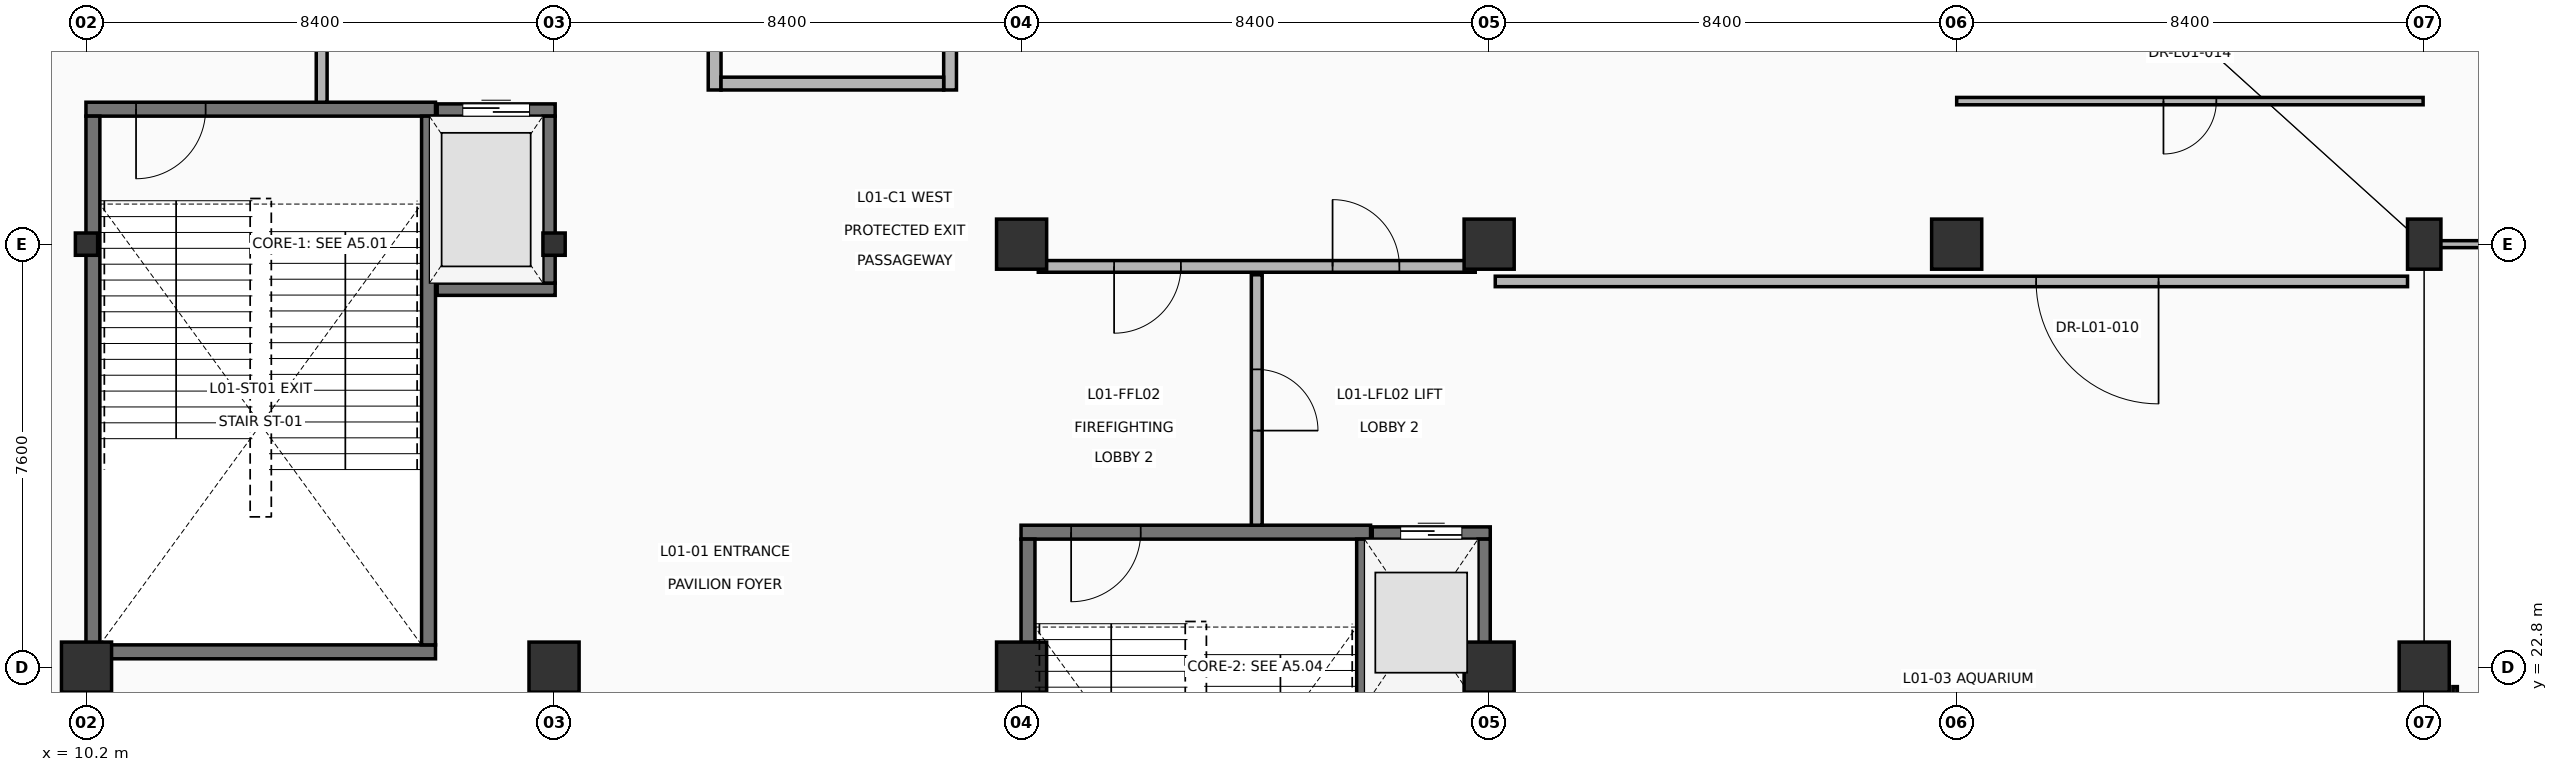
"""IFC4 building model, lengths in metres.
Left out: names, types, materials, properties, quantities, classifications, styles, units other than length and angle.
Written with IfcOpenShell. Run it as: python <this file> out.ifc"""

import sys

from ifc_helpers import new_model, si_unit, direction, frame, frame_2d, origin, origin_2d, place, context, subcontext, project, spatial, rectangle, hollow_rectangle, extrude, element, fill, save


model = new_model("IFC4")
c1 = context("Model", 3, precision=1e-05, world=origin(), true_north=direction((0.0, 1.0)))
c2 = subcontext(c1, "Body", "Model", "MODEL_VIEW")
j1 = project(units=[si_unit("LENGTHUNIT", "METRE"), si_unit("PLANEANGLEUNIT", "RADIAN")], contexts=[c1])
p1 = place(None, origin())
s1 = spatial("IfcSite", under=j1, at=p1, CompositionType="ELEMENT")
p2 = place(p1, origin())
s2 = spatial("IfcBuilding", under=s1, at=p2, CompositionType="ELEMENT")
p3 = place(p2, origin())
s3 = spatial("IfcBuildingStorey", under=s2, at=p3, CompositionType="ELEMENT", Elevation=0.0)
p4 = place(p3, frame((10.2, 22.8, 0.0), z_axis=(0.0, 0.0, 1.0), x_axis=(1.0, 0.0, 0.0)))
e1 = element("IfcColumn", 1, at=p4, inside=s3, PredefinedType="COLUMN", context=c2, shape_type="SweptSolid", body=[
    extrude(rectangle(XDim=0.9, YDim=0.9, at=origin_2d()), origin(), (0.0, 0.0, 1.0), 5.4),
])
p5 = place(p3, frame((10.2, 30.4, 0.0), z_axis=(0.0, 0.0, 1.0), x_axis=(1.0, 0.0, 0.0)))
e2 = element("IfcColumn", 2, at=p5, inside=s3, PredefinedType="COLUMN", context=c2, shape_type="SweptSolid", body=[
    extrude(hollow_rectangle(XDim=0.4, YDim=0.4, WallThickness=0.016, at=origin_2d()), origin(), (0.0, 0.0, 1.0), 5.4),
])
p6 = place(p3, frame((18.6, 22.8, 0.0), z_axis=(0.0, 0.0, 1.0), x_axis=(1.0, 0.0, 0.0)))
e3 = element("IfcColumn", 3, at=p6, inside=s3, PredefinedType="COLUMN", context=c2, shape_type="SweptSolid", body=[
    extrude(rectangle(XDim=0.9, YDim=0.9, at=origin_2d()), origin(), (0.0, 0.0, 1.0), 5.4),
])
p7 = place(p3, frame((18.6, 30.4, 0.0), z_axis=(0.0, 0.0, 1.0), x_axis=(1.0, 0.0, 0.0)))
e4 = element("IfcColumn", 4, at=p7, inside=s3, PredefinedType="COLUMN", context=c2, shape_type="SweptSolid", body=[
    extrude(hollow_rectangle(XDim=0.4, YDim=0.4, WallThickness=0.016, at=origin_2d()), origin(), (0.0, 0.0, 1.0), 5.4),
])
for number, where, z_axis, x_axis in (
    (5, (27.0, 22.8, 0.0), (0.0, 0.0, 1.0), (1.0, 0.0, 0.0)),
    (6, (27.0, 30.4, 0.0), (0.0, 0.0, 1.0), (1.0, 0.0, 0.0)),
    (7, (35.4, 22.8, 0.0), (0.0, 0.0, 1.0), (1.0, 0.0, 0.0)),
    (8, (35.4, 30.4, 0.0), (0.0, 0.0, 1.0), (1.0, 0.0, 0.0)),
    (9, (43.8, 30.4, 0.0), (0.0, 0.0, 1.0), (1.0, 0.0, 0.0)),
    (10, (52.2, 22.8, 0.0), (0.0, 0.0, 1.0), (1.0, 0.0, 0.0)),
):
    element("IfcColumn", number, at=place(p3, frame(where, z_axis=z_axis, x_axis=x_axis)), inside=s3, PredefinedType="COLUMN", context=c2, shape_type="SweptSolid", body=[
        extrude(rectangle(XDim=0.9, YDim=0.9, at=origin_2d()), origin(), (0.0, 0.0, 1.0), 5.4),
    ])
p8 = place(p3, frame((52.2, 30.4, 0.0), z_axis=(0.0, 0.0, 1.0), x_axis=(1.0, 0.0, 0.0)))
e11 = element("IfcColumn", 11, at=p8, inside=s3, PredefinedType="COLUMN", context=c2, shape_type="SweptSolid", body=[
    extrude(rectangle(XDim=0.6, YDim=0.9, at=origin_2d()), origin(), (0.0, 0.0, 1.0), 5.4),
])
p9 = place(p3, frame((52.05, 22.365, 0.0), z_axis=(0.0, 0.0, 1.0), x_axis=(0.0, -1.0, 0.0)))
e12 = element("IfcWall", 12, at=p9, inside=s3, PredefinedType="SOLIDWALL", context=c2, shape_type="SweptSolid", body=[
    extrude(rectangle(XDim=7.185, YDim=0.3, at=frame_2d((3.593, 0.0))), origin(), (0.0, 0.0, 1.0), 5.16),
])
p10 = place(p9, frame((2.392, 0.0, 0.0)))
e13 = element("IfcOpeningElement", 13, at=p10, cuts=e12, PredefinedType="OPENING", context=c2, shape_type="SweptSolid", body=[
    extrude(rectangle(XDim=2.4, YDim=2.6, at=frame_2d((1.2, 1.3))), frame((0.0, 0.16, 0.0), z_axis=(0.0, -1.0, 0.0), x_axis=(1.0, 0.0, 0.0)), (0.0, 0.0, 1.0), 0.32),
])
p11 = place(p3, frame((10.19, 23.075, 0.0), z_axis=(0.0, 0.0, 1.0), x_axis=(1.0, 0.0, 0.0)))
e14 = element("IfcWall", 14, at=p11, inside=s3, PredefinedType="SHEAR", context=c2, shape_type="SweptSolid", body=[
    extrude(rectangle(XDim=6.28, YDim=0.25, at=frame_2d((3.14, 0.0))), origin(), (0.0, 0.0, 1.0), 5.14),
])
p12 = place(p3, frame((10.19, 32.825, 0.0), z_axis=(0.0, 0.0, 1.0), x_axis=(1.0, 0.0, 0.0)))
e15 = element("IfcWall", 15, at=p12, inside=s3, PredefinedType="SHEAR", context=c2, shape_type="SweptSolid", body=[
    extrude(rectangle(XDim=6.28, YDim=0.25, at=frame_2d((3.14, 0.0))), origin(), (0.0, 0.0, 1.0), 5.14),
])
p13 = place(p12, frame((0.9, 0.0, 0.0)))
e16 = element("IfcOpeningElement", 16, at=p13, cuts=e15, PredefinedType="OPENING", context=c2, shape_type="SweptSolid", body=[
    extrude(rectangle(XDim=1.25, YDim=2.2, at=frame_2d((0.625, 1.1))), frame((0.0, 0.135, 0.0), z_axis=(0.0, -1.0, 0.0), x_axis=(1.0, 0.0, 0.0)), (0.0, 0.0, 1.0), 0.27),
])
for number, where, z_axis, x_axis in (
    (17, (10.315, 23.2, 0.0), (0.0, 0.0, 1.0), (0.0, 1.0, 0.0)),
    (18, (16.345, 23.2, 0.0), (0.0, 0.0, 1.0), (0.0, 1.0, 0.0)),
):
    element("IfcWall", number, at=place(p3, frame(where, z_axis=z_axis, x_axis=x_axis)), inside=s3, PredefinedType="SHEAR", context=c2, shape_type="SweptSolid", body=[
        extrude(rectangle(XDim=9.5, YDim=0.25, at=frame_2d((4.75, 0.0))), origin(), (0.0, 0.0, 1.0), 5.14),
    ])
p14 = place(p3, frame((16.5, 29.59, 0.0), z_axis=(0.0, 0.0, 1.0), x_axis=(1.0, 0.0, 0.0)))
e19 = element("IfcWall", 19, at=p14, inside=s3, PredefinedType="SHEAR", context=c2, shape_type="SweptSolid", body=[
    extrude(rectangle(XDim=2.12, YDim=0.22, at=frame_2d((1.06, 0.0))), origin(), (0.0, 0.0, 1.0), 5.14),
])
p15 = place(p3, frame((16.5, 32.81, 0.0), z_axis=(0.0, 0.0, 1.0), x_axis=(1.0, 0.0, 0.0)))
e20 = element("IfcWall", 20, at=p15, inside=s3, PredefinedType="SHEAR", context=c2, shape_type="SweptSolid", body=[
    extrude(rectangle(XDim=2.12, YDim=0.22, at=frame_2d((1.06, 0.0))), origin(), (0.0, 0.0, 1.0), 5.14),
])
p16 = place(p15, frame((0.46, 0.0, 0.0)))
e21 = element("IfcOpeningElement", 21, at=p16, cuts=e20, PredefinedType="OPENING", context=c2, shape_type="SweptSolid", body=[
    extrude(rectangle(XDim=1.2, YDim=2.2, at=frame_2d((0.6, 1.1))), frame((0.0, 0.12, 0.0), z_axis=(0.0, -1.0, 0.0), x_axis=(1.0, 0.0, 0.0)), (0.0, 0.0, 1.0), 0.24),
])
p17 = place(p3, frame((18.51, 29.7, 0.0), z_axis=(0.0, 0.0, 1.0), x_axis=(0.0, 1.0, 0.0)))
e22 = element("IfcWall", 22, at=p17, inside=s3, PredefinedType="SHEAR", context=c2, shape_type="SweptSolid", body=[
    extrude(rectangle(XDim=3.0, YDim=0.22, at=frame_2d((1.5, 0.0))), origin(), (0.0, 0.0, 1.0), 5.14),
])
p18 = place(p3, frame((14.425, 32.95, 0.0), z_axis=(0.0, 0.0, 1.0), x_axis=(0.0, 1.0, 0.0)))
e23 = element("IfcWall", 23, at=p18, inside=s3, PredefinedType="PARTITIONING", context=c2, shape_type="SweptSolid", body=[
    extrude(rectangle(XDim=4.5, YDim=0.195, at=frame_2d((2.25, 0.0))), origin(), (0.0, 0.0, 1.0), 5.14),
])
p19 = place(p18, frame((1.7, 0.0, 0.0)))
e24 = element("IfcOpeningElement", 24, at=p19, cuts=e23, PredefinedType="OPENING", context=c2, shape_type="SweptSolid", body=[
    extrude(rectangle(XDim=1.1, YDim=2.15, at=frame_2d((0.55, 1.075))), frame((0.0, 0.107, 0.0), z_axis=(0.0, -1.0, 0.0), x_axis=(1.0, 0.0, 0.0)), (0.0, 0.0, 1.0), 0.215),
])
p20 = place(p3, frame((26.99, 25.225, 0.0), z_axis=(0.0, 0.0, 1.0), x_axis=(1.0, 0.0, 0.0)))
e25 = element("IfcWall", 25, at=p20, inside=s3, PredefinedType="SHEAR", context=c2, shape_type="SweptSolid", body=[
    extrude(rectangle(XDim=6.28, YDim=0.25, at=frame_2d((3.14, 0.0))), origin(), (0.0, 0.0, 1.0), 5.14),
])
p21 = place(p20, frame((0.9, 0.0, 0.0)))
e26 = element("IfcOpeningElement", 26, at=p21, cuts=e25, PredefinedType="OPENING", context=c2, shape_type="SweptSolid", body=[
    extrude(rectangle(XDim=1.25, YDim=2.2, at=frame_2d((0.625, 1.1))), frame((0.0, 0.135, 0.0), z_axis=(0.0, -1.0, 0.0), x_axis=(1.0, 0.0, 0.0)), (0.0, 0.0, 1.0), 0.27),
])
for number, where, z_axis, x_axis in (
    (27, (27.115, 15.6, 0.0), (0.0, 0.0, 1.0), (0.0, 1.0, 0.0)),
    (28, (33.145, 15.6, 0.0), (0.0, 0.0, 1.0), (0.0, 1.0, 0.0)),
):
    element("IfcWall", number, at=place(p3, frame(where, z_axis=z_axis, x_axis=x_axis)), inside=s3, PredefinedType="SHEAR", context=c2, shape_type="SweptSolid", body=[
        extrude(rectangle(XDim=9.5, YDim=0.25, at=frame_2d((4.75, 0.0))), origin(), (0.0, 0.0, 1.0), 5.14),
    ])
p22 = place(p3, frame((33.3, 25.21, 0.0), z_axis=(0.0, 0.0, 1.0), x_axis=(1.0, 0.0, 0.0)))
e29 = element("IfcWall", 29, at=p22, inside=s3, PredefinedType="SHEAR", context=c2, shape_type="SweptSolid", body=[
    extrude(rectangle(XDim=2.12, YDim=0.22, at=frame_2d((1.06, 0.0))), origin(), (0.0, 0.0, 1.0), 5.14),
])
p23 = place(p22, frame((0.51, 0.0, 0.0)))
e30 = element("IfcOpeningElement", 30, at=p23, cuts=e29, PredefinedType="OPENING", context=c2, shape_type="SweptSolid", body=[
    extrude(rectangle(XDim=1.1, YDim=2.15, at=frame_2d((0.55, 1.075))), frame((0.0, 0.12, 0.0), z_axis=(0.0, -1.0, 0.0), x_axis=(1.0, 0.0, 0.0)), (0.0, 0.0, 1.0), 0.24),
])
p24 = place(p3, frame((35.31, 22.1, 0.0), z_axis=(0.0, 0.0, 1.0), x_axis=(0.0, 1.0, 0.0)))
e31 = element("IfcWall", 31, at=p24, inside=s3, PredefinedType="SHEAR", context=c2, shape_type="SweptSolid", body=[
    extrude(rectangle(XDim=3.0, YDim=0.22, at=frame_2d((1.5, 0.0))), origin(), (0.0, 0.0, 1.0), 5.14),
])
p25 = place(p3, frame((27.3, 30.0, 0.0), z_axis=(0.0, 0.0, 1.0), x_axis=(1.0, 0.0, 0.0)))
e32 = element("IfcWall", 32, at=p25, inside=s3, PredefinedType="PARTITIONING", context=c2, shape_type="SweptSolid", body=[
    extrude(rectangle(XDim=7.85, YDim=0.21, at=frame_2d((3.925, 0.0))), origin(), (0.0, 0.0, 1.0), 5.14),
])
p26 = place(p25, frame((1.362, 0.0, 0.0)))
e33 = element("IfcOpeningElement", 33, at=p26, cuts=e32, PredefinedType="OPENING", context=c2, shape_type="SweptSolid", body=[
    extrude(rectangle(XDim=1.2, YDim=2.2, at=frame_2d((0.6, 1.1))), frame((0.0, 0.115, 0.0), z_axis=(0.0, -1.0, 0.0), x_axis=(1.0, 0.0, 0.0)), (0.0, 0.0, 1.0), 0.23),
])
p27 = place(p25, frame((5.287, 0.0, 0.0)))
e34 = element("IfcOpeningElement", 34, at=p27, cuts=e32, PredefinedType="OPENING", context=c2, shape_type="SweptSolid", body=[
    extrude(rectangle(XDim=1.2, YDim=2.2, at=frame_2d((0.6, 1.1))), frame((0.0, 0.115, 0.0), z_axis=(0.0, -1.0, 0.0), x_axis=(1.0, 0.0, 0.0)), (0.0, 0.0, 1.0), 0.23),
])
p28 = place(p3, frame((31.225, 25.35, 0.0), z_axis=(0.0, 0.0, 1.0), x_axis=(0.0, 1.0, 0.0)))
e35 = element("IfcWall", 35, at=p28, inside=s3, PredefinedType="PARTITIONING", context=c2, shape_type="SweptSolid", body=[
    extrude(rectangle(XDim=4.5, YDim=0.195, at=frame_2d((2.25, 0.0))), origin(), (0.0, 0.0, 1.0), 5.14),
])
p29 = place(p28, frame((1.7, 0.0, 0.0)))
e36 = element("IfcOpeningElement", 36, at=p29, cuts=e35, PredefinedType="OPENING", context=c2, shape_type="SweptSolid", body=[
    extrude(rectangle(XDim=1.1, YDim=2.15, at=frame_2d((0.55, 1.075))), frame((0.0, 0.107, 0.0), z_axis=(0.0, -1.0, 0.0), x_axis=(1.0, 0.0, 0.0)), (0.0, 0.0, 1.0), 0.215),
])
p30 = place(p3, frame((21.485, 33.17, 0.0), z_axis=(0.0, 0.0, 1.0), x_axis=(0.0, 1.0, 0.0)))
e37 = element("IfcWall", 37, at=p30, inside=s3, PredefinedType="PLUMBINGWALL", context=c2, shape_type="SweptSolid", body=[
    extrude(rectangle(XDim=4.46, YDim=0.23, at=frame_2d((2.23, 0.0))), origin(), (0.0, 0.0, 1.0), 5.14),
])
p31 = place(p30, frame((1.755, 0.0, 0.0)))
e38 = element("IfcOpeningElement", 38, at=p31, cuts=e37, PredefinedType="OPENING", context=c2, shape_type="SweptSolid", body=[
    extrude(rectangle(XDim=0.95, YDim=2.1, at=frame_2d((0.475, 1.05))), frame((0.0, 0.125, 0.0), z_axis=(0.0, -1.0, 0.0), x_axis=(1.0, 0.0, 0.0)), (0.0, 0.0, 1.0), 0.25),
])
p32 = place(p3, frame((25.715, 33.17, 0.0), z_axis=(0.0, 0.0, 1.0), x_axis=(0.0, 1.0, 0.0)))
e39 = element("IfcWall", 39, at=p32, inside=s3, PredefinedType="PLUMBINGWALL", context=c2, shape_type="SweptSolid", body=[
    extrude(rectangle(XDim=4.46, YDim=0.23, at=frame_2d((2.23, 0.0))), origin(), (0.0, 0.0, 1.0), 5.14),
])
p33 = place(p3, frame((21.6, 33.285, 0.0), z_axis=(0.0, 0.0, 1.0), x_axis=(1.0, 0.0, 0.0)))
e40 = element("IfcWall", 40, at=p33, inside=s3, PredefinedType="PLUMBINGWALL", context=c2, shape_type="SweptSolid", body=[
    extrude(rectangle(XDim=4.0, YDim=0.23, at=frame_2d((2.0, 0.0))), origin(), (0.0, 0.0, 1.0), 4.832),
])
p34 = place(p3, frame((51.9, 29.73, 0.0), z_axis=(0.0, 0.0, 1.0), x_axis=(-1.0, 0.0, 0.0)))
e41 = element("IfcWall", 41, at=p34, inside=s3, PredefinedType="PARTITIONING", context=c2, shape_type="SweptSolid", body=[
    extrude(rectangle(XDim=16.39, YDim=0.188, at=frame_2d((8.195, 0.0))), origin(), (0.0, 0.0, 1.0), 4.442),
])
p35 = place(p34, frame((4.473, 0.0, 0.0)))
e42 = element("IfcOpeningElement", 42, at=p35, cuts=e41, PredefinedType="OPENING", context=c2, shape_type="SweptSolid", body=[
    extrude(rectangle(XDim=2.2, YDim=2.45, at=frame_2d((1.1, 1.225))), frame((0.0, 0.104, 0.0), z_axis=(0.0, -1.0, 0.0), x_axis=(1.0, 0.0, 0.0)), (0.0, 0.0, 1.0), 0.208),
])
p36 = place(p3, frame((43.8, 32.97, 0.0), z_axis=(0.0, 0.0, 1.0), x_axis=(1.0, 0.0, 0.0)))
e43 = element("IfcWall", 43, at=p36, inside=s3, PredefinedType="PARTITIONING", context=c2, shape_type="SweptSolid", body=[
    extrude(rectangle(XDim=8.38, YDim=0.132, at=frame_2d((4.19, 0.0))), origin(), (0.0, 0.0, 1.0), 4.402),
])
p37 = place(p36, frame((3.715, 0.0, 0.0)))
e44 = element("IfcOpeningElement", 44, at=p37, cuts=e43, PredefinedType="OPENING", context=c2, shape_type="SweptSolid", body=[
    extrude(rectangle(XDim=0.95, YDim=2.1, at=frame_2d((0.475, 1.05))), frame((0.0, 0.076, 0.0), z_axis=(0.0, -1.0, 0.0), x_axis=(1.0, 0.0, 0.0)), (0.0, 0.0, 1.0), 0.152),
])
p38 = place(p3, frame((94.0, 30.4, 0.0), z_axis=(0.0, 0.0, 1.0), x_axis=(-1.0, 0.0, 0.0)))
e45 = element("IfcWall", 45, at=p38, inside=s3, PredefinedType="PARTITIONING", context=c2, shape_type="SweptSolid", body=[
    extrude(rectangle(XDim=41.7, YDim=0.125, at=frame_2d((20.85, 0.0))), origin(), (0.0, 0.0, 1.0), 4.325),
])
p39 = place(p38, frame((20.375, 0.0, 0.0)))
e46 = element("IfcOpeningElement", 46, at=p39, cuts=e45, PredefinedType="OPENING", context=c2, shape_type="SweptSolid", body=[
    extrude(rectangle(XDim=0.95, YDim=2.1, at=frame_2d((0.475, 1.05))), frame((0.0, 0.073, 0.0), z_axis=(0.0, -1.0, 0.0), x_axis=(1.0, 0.0, 0.0)), (0.0, 0.0, 1.0), 0.145),
])
p40 = place(p13, origin())
e47 = element("IfcDoor", 47, at=p40, inside=s3, OperationType="SINGLE_SWING_RIGHT", PredefinedType="DOOR", context=c2, shape_type="SweptSolid", body=[
    extrude(rectangle(XDim=1.25, YDim=2.2, at=frame_2d((0.625, 1.1))), frame((0.0, 0.025, 0.0), z_axis=(0.0, -1.0, 0.0), x_axis=(1.0, 0.0, 0.0)), (0.0, 0.0, 1.0), 0.05),
])
fill(e16, e47)
p41 = place(p16, origin())
e48 = element("IfcDoor", 48, at=p41, inside=s3, OperationType="DOUBLE_DOOR_SLIDING", PredefinedType="DOOR", context=c2, shape_type="SweptSolid", body=[
    extrude(rectangle(XDim=1.2, YDim=2.2, at=frame_2d((0.6, 1.1))), frame((0.0, 0.025, 0.0), z_axis=(0.0, -1.0, 0.0), x_axis=(1.0, 0.0, 0.0)), (0.0, 0.0, 1.0), 0.05),
])
fill(e21, e48)
p42 = place(p21, origin())
e49 = element("IfcDoor", 49, at=p42, inside=s3, OperationType="SINGLE_SWING_RIGHT", PredefinedType="DOOR", context=c2, shape_type="SweptSolid", body=[
    extrude(rectangle(XDim=1.25, YDim=2.2, at=frame_2d((0.625, 1.1))), frame((0.0, 0.025, 0.0), z_axis=(0.0, -1.0, 0.0), x_axis=(1.0, 0.0, 0.0)), (0.0, 0.0, 1.0), 0.05),
])
fill(e26, e49)
p43 = place(p23, origin())
e50 = element("IfcDoor", 50, at=p43, inside=s3, OperationType="DOUBLE_DOOR_SLIDING", PredefinedType="DOOR", context=c2, shape_type="SweptSolid", body=[
    extrude(rectangle(XDim=1.1, YDim=2.15, at=frame_2d((0.55, 1.075))), frame((0.0, 0.025, 0.0), z_axis=(0.0, -1.0, 0.0), x_axis=(1.0, 0.0, 0.0)), (0.0, 0.0, 1.0), 0.05),
])
fill(e30, e50)
p44 = place(p26, origin())
e51 = element("IfcDoor", 51, at=p44, inside=s3, OperationType="SINGLE_SWING_RIGHT", PredefinedType="DOOR", context=c2, shape_type="SweptSolid", body=[
    extrude(rectangle(XDim=1.2, YDim=2.2, at=frame_2d((0.6, 1.1))), frame((0.0, 0.025, 0.0), z_axis=(0.0, -1.0, 0.0), x_axis=(1.0, 0.0, 0.0)), (0.0, 0.0, 1.0), 0.05),
])
fill(e33, e51)
p45 = place(p27, origin())
e52 = element("IfcDoor", 52, at=p45, inside=s3, OperationType="SINGLE_SWING_LEFT", PredefinedType="DOOR", context=c2, shape_type="SweptSolid", body=[
    extrude(rectangle(XDim=1.2, YDim=2.2, at=frame_2d((0.6, 1.1))), frame((0.0, 0.025, 0.0), z_axis=(0.0, -1.0, 0.0), x_axis=(1.0, 0.0, 0.0)), (0.0, 0.0, 1.0), 0.05),
])
fill(e34, e52)
p46 = place(p29, origin())
e53 = element("IfcDoor", 53, at=p46, inside=s3, OperationType="SINGLE_SWING_RIGHT", PredefinedType="DOOR", context=c2, shape_type="SweptSolid", body=[
    extrude(rectangle(XDim=1.1, YDim=2.15, at=frame_2d((0.55, 1.075))), frame((0.0, 0.025, 0.0), z_axis=(0.0, -1.0, 0.0), x_axis=(1.0, 0.0, 0.0)), (0.0, 0.0, 1.0), 0.05),
])
fill(e36, e53)
p47 = place(p35, origin())
e54 = element("IfcDoor", 54, at=p47, inside=s3, OperationType="DOUBLE_DOOR_SINGLE_SWING", PredefinedType="DOOR", context=c2, shape_type="SweptSolid", body=[
    extrude(rectangle(XDim=2.2, YDim=2.45, at=frame_2d((1.1, 1.225))), frame((0.0, 0.025, 0.0), z_axis=(0.0, -1.0, 0.0), x_axis=(1.0, 0.0, 0.0)), (0.0, 0.0, 1.0), 0.05),
])
fill(e42, e54)
p48 = place(p37, origin())
e55 = element("IfcDoor", 55, at=p48, inside=s3, OperationType="SINGLE_SWING_RIGHT", PredefinedType="DOOR", context=c2, shape_type="SweptSolid", body=[
    extrude(rectangle(XDim=0.95, YDim=2.1, at=frame_2d((0.475, 1.05))), frame((0.0, 0.025, 0.0), z_axis=(0.0, -1.0, 0.0), x_axis=(1.0, 0.0, 0.0)), (0.0, 0.0, 1.0), 0.05),
])
fill(e44, e55)
save(model, sys.argv[1])
